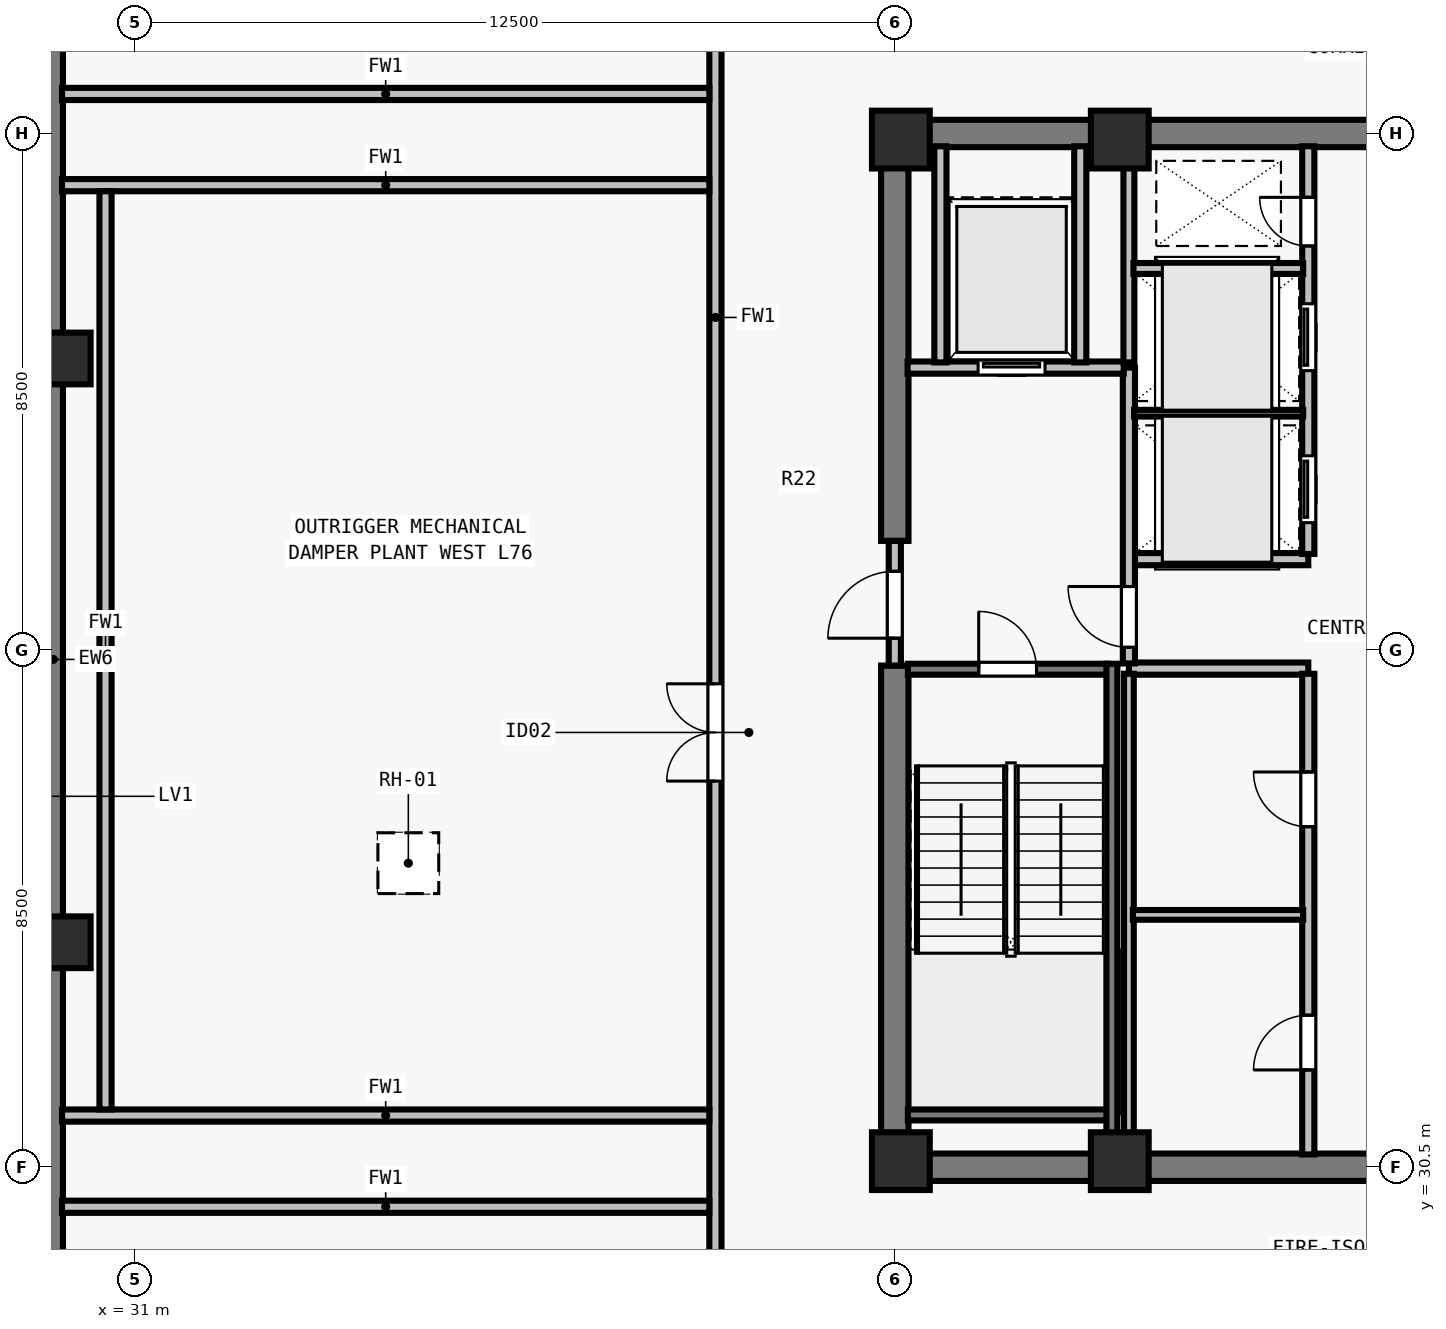
"""IFC4 building model, lengths in metres.
Left out: names, types, materials, properties, quantities, classifications, styles, units other than length and angle.
Written with IfcOpenShell. Run it as: python <this file> out.ifc"""

import sys

from ifc_helpers import new_model, si_unit, direction, frame, frame_2d, origin, origin_2d, place, context, subcontext, project, spatial, rectangle, extrude, element, fill, save


model = new_model("IFC4")
c1 = context("Model", 3, precision=1e-05, world=origin(), true_north=direction((0.0, 1.0)))
c2 = subcontext(c1, "Body", "Model", "MODEL_VIEW")
j1 = project(units=[si_unit("LENGTHUNIT", "METRE"), si_unit("PLANEANGLEUNIT", "RADIAN")], contexts=[c1])
p1 = place(None, origin())
s1 = spatial("IfcSite", under=j1, at=p1, CompositionType="ELEMENT")
p2 = place(p1, origin())
s2 = spatial("IfcBuilding", under=s1, at=p2, CompositionType="ELEMENT")
p3 = place(p2, frame((0.0, 0.0, 276.0)))
s3 = spatial("IfcBuildingStorey", under=s2, at=p3, CompositionType="ELEMENT", Elevation=276.0)
for number, where, z_axis, x_axis in (
    (1, (43.6, 30.6, 0.0), (0.0, 0.0, 1.0), (1.0, 0.0, 0.0)),
    (2, (47.2, 30.6, 0.0), (0.0, 0.0, 1.0), (1.0, 0.0, 0.0)),
    (3, (43.6, 47.4, 0.0), (0.0, 0.0, 1.0), (1.0, 0.0, 0.0)),
    (4, (47.2, 47.4, 0.0), (0.0, 0.0, 1.0), (1.0, 0.0, 0.0)),
):
    element("IfcColumn", number, at=place(p3, frame(where, z_axis=z_axis, x_axis=x_axis)), inside=s3, PredefinedType="COLUMN", context=c2, shape_type="SweptSolid", body=[
        extrude(rectangle(XDim=0.95, YDim=0.95, at=origin_2d()), origin(), (0.0, 0.0, 1.0), 4.5),
    ])
for number, where, z_axis, x_axis in (
    (5, (29.85, 43.8, 0.0), (0.0, 0.0, 1.0), (0.0, 1.0, 0.0)),
    (6, (29.85, 34.2, 0.0), (0.0, 0.0, 1.0), (0.0, 1.0, 0.0)),
):
    element("IfcColumn", number, at=place(p3, frame(where, z_axis=z_axis, x_axis=x_axis)), inside=s3, PredefinedType="COLUMN", context=c2, shape_type="SweptSolid", body=[
        extrude(rectangle(XDim=0.85, YDim=0.85, at=origin_2d()), origin(), (0.0, 0.0, 1.0), 4.5),
    ])
p4 = place(p3, frame((29.66, 21.5, 0.0), z_axis=(0.0, 0.0, 1.0), x_axis=(0.0, 1.0, 0.0)))
e7 = element("IfcWall", 7, at=p4, inside=s3, PredefinedType="SOLIDWALL", context=c2, shape_type="SweptSolid", body=[
    extrude(rectangle(XDim=34.702, YDim=0.32, at=frame_2d((17.351, 0.0))), origin(), (0.0, 0.0, 1.0), 4.29),
])
for number, where, z_axis, x_axis in (
    (8, (43.275, 30.5, 0.0), (0.0, 0.0, 1.0), (1.0, 0.0, 0.0)),
    (9, (43.275, 47.5, 0.0), (0.0, 0.0, 1.0), (1.0, 0.0, 0.0)),
):
    element("IfcWall", number, at=place(p3, frame(where, z_axis=z_axis, x_axis=x_axis)), inside=s3, PredefinedType="SHEAR", context=c2, shape_type="SweptSolid", body=[
        extrude(rectangle(XDim=17.45, YDim=0.45, at=frame_2d((8.725, 0.0))), origin(), (0.0, 0.0, 1.0), 4.29),
    ])
p5 = place(p3, frame((43.5, 30.715, 0.0), z_axis=(0.0, 0.0, 1.0), x_axis=(0.0, 1.0, 0.0)))
e10 = element("IfcWall", 10, at=p5, inside=s3, PredefinedType="SHEAR", context=c2, shape_type="SweptSolid", body=[
    extrude(rectangle(XDim=8.035, YDim=0.45, at=frame_2d((4.018, 0.0))), origin(), (0.0, 0.0, 1.0), 4.29),
])
p6 = place(p3, frame((43.5, 40.8, 0.0), z_axis=(0.0, 0.0, 1.0), x_axis=(0.0, 1.0, 0.0)))
e11 = element("IfcWall", 11, at=p6, inside=s3, PredefinedType="SHEAR", context=c2, shape_type="SweptSolid", body=[
    extrude(rectangle(XDim=6.485, YDim=0.45, at=frame_2d((3.242, 0.0))), origin(), (0.0, 0.0, 1.0), 4.29),
])
for number, where, z_axis, x_axis in (
    (12, (47.35, 38.7, 0.0), (0.0, 0.0, 1.0), (1.0, 0.0, 0.0)),
    (13, (47.35, 40.5, 0.0), (0.0, 0.0, 1.0), (1.0, 0.0, 0.0)),
):
    element("IfcWall", number, at=place(p3, frame(where, z_axis=z_axis, x_axis=x_axis)), inside=s3, PredefinedType="SOLIDWALL", context=c2, shape_type="SweptSolid", body=[
        extrude(rectangle(XDim=2.95, YDim=0.2, at=frame_2d((1.475, 0.0))), origin(), (0.0, 0.0, 1.0), 4.29),
    ])
p7 = place(p3, frame((50.3, 30.71, 0.0), z_axis=(0.0, 0.0, 1.0), x_axis=(0.0, 1.0, 0.0)))
e14 = element("IfcWall", 14, at=p7, inside=s3, PredefinedType="SOLIDWALL", context=c2, shape_type="SweptSolid", body=[
    extrude(rectangle(XDim=7.905, YDim=0.2, at=frame_2d((3.953, 0.0))), origin(), (0.0, 0.0, 1.0), 4.29),
])
p8 = place(p7, frame((1.39, 0.0, 0.0)))
e15 = element("IfcOpeningElement", 15, at=p8, cuts=e14, PredefinedType="OPENING", context=c2, shape_type="SweptSolid", body=[
    extrude(rectangle(XDim=0.9, YDim=2.12, at=frame_2d((0.45, 1.06))), frame((0.0, 0.11, 0.0), z_axis=(0.0, -1.0, 0.0), x_axis=(1.0, 0.0, 0.0)), (0.0, 0.0, 1.0), 0.22),
])
p9 = place(p7, frame((5.39, 0.0, 0.0)))
e16 = element("IfcOpeningElement", 16, at=p9, cuts=e14, PredefinedType="OPENING", context=c2, shape_type="SweptSolid", body=[
    extrude(rectangle(XDim=0.9, YDim=2.12, at=frame_2d((0.45, 1.06))), frame((0.0, 0.11, 0.0), z_axis=(0.0, -1.0, 0.0), x_axis=(1.0, 0.0, 0.0)), (0.0, 0.0, 1.0), 0.22),
])
p10 = place(p3, frame((50.3, 40.585, 0.0), z_axis=(0.0, 0.0, 1.0), x_axis=(0.0, 1.0, 0.0)))
e17 = element("IfcWall", 17, at=p10, inside=s3, PredefinedType="SOLIDWALL", context=c2, shape_type="SweptSolid", body=[
    extrude(rectangle(XDim=6.705, YDim=0.2, at=frame_2d((3.353, 0.0))), origin(), (0.0, 0.0, 1.0), 4.29),
])
p11 = place(p10, frame((0.515, 0.0, 0.0)))
e18 = element("IfcOpeningElement", 18, at=p11, cuts=e17, PredefinedType="OPENING", context=c2, shape_type="SweptSolid", body=[
    extrude(rectangle(XDim=1.1, YDim=2.2, at=frame_2d((0.55, 1.1))), frame((0.0, 0.11, 0.0), z_axis=(0.0, -1.0, 0.0), x_axis=(1.0, 0.0, 0.0)), (0.0, 0.0, 1.0), 0.22),
])
p12 = place(p10, frame((3.015, 0.0, 0.0)))
e19 = element("IfcOpeningElement", 19, at=p12, cuts=e17, PredefinedType="OPENING", context=c2, shape_type="SweptSolid", body=[
    extrude(rectangle(XDim=1.1, YDim=2.2, at=frame_2d((0.55, 1.1))), frame((0.0, 0.11, 0.0), z_axis=(0.0, -1.0, 0.0), x_axis=(1.0, 0.0, 0.0)), (0.0, 0.0, 1.0), 0.22),
])
p13 = place(p10, frame((5.065, 0.0, 0.0)))
e20 = element("IfcOpeningElement", 20, at=p13, cuts=e17, PredefinedType="OPENING", context=c2, shape_type="SweptSolid", body=[
    extrude(rectangle(XDim=0.8, YDim=2.08, at=frame_2d((0.4, 1.04))), frame((0.0, 0.11, 0.0), z_axis=(0.0, -1.0, 0.0), x_axis=(1.0, 0.0, 0.0)), (0.0, 0.0, 1.0), 0.22),
])
p14 = place(p3, frame((43.5, 38.75, 0.0), z_axis=(0.0, 0.0, 1.0), x_axis=(0.0, 1.0, 0.0)))
e21 = element("IfcWall", 21, at=p14, inside=s3, PredefinedType="SOLIDWALL", context=c2, shape_type="SweptSolid", body=[
    extrude(rectangle(XDim=2.05, YDim=0.2, at=frame_2d((1.025, 0.0))), origin(), (0.0, 0.0, 1.0), 4.29),
])
p15 = place(p14, frame((0.45, 0.0, 0.0)))
e22 = element("IfcOpeningElement", 22, at=p15, cuts=e21, PredefinedType="OPENING", context=c2, shape_type="SweptSolid", body=[
    extrude(rectangle(XDim=1.1, YDim=2.15, at=frame_2d((0.55, 1.075))), frame((0.0, 0.11, 0.0), z_axis=(0.0, -1.0, 0.0), x_axis=(1.0, 0.0, 0.0)), (0.0, 0.0, 1.0), 0.22),
])
p16 = place(p3, frame((47.35, 38.785, 0.0), z_axis=(0.0, 0.0, 1.0), x_axis=(0.0, 1.0, 0.0)))
e23 = element("IfcWall", 23, at=p16, inside=s3, PredefinedType="SOLIDWALL", context=c2, shape_type="SweptSolid", body=[
    extrude(rectangle(XDim=4.865, YDim=0.2, at=frame_2d((2.433, 0.0))), origin(), (0.0, 0.0, 1.0), 4.29),
])
p17 = place(p16, frame((0.265, 0.0, 0.0)))
e24 = element("IfcOpeningElement", 24, at=p17, cuts=e23, PredefinedType="OPENING", context=c2, shape_type="SweptSolid", body=[
    extrude(rectangle(XDim=1.0, YDim=2.15, at=frame_2d((0.5, 1.075))), frame((0.0, 0.11, 0.0), z_axis=(0.0, -1.0, 0.0), x_axis=(1.0, 0.0, 0.0)), (0.0, 0.0, 1.0), 0.22),
])
p18 = place(p3, frame((43.71, 43.65, 0.0), z_axis=(0.0, 0.0, 1.0), x_axis=(1.0, 0.0, 0.0)))
e25 = element("IfcWall", 25, at=p18, inside=s3, PredefinedType="SOLIDWALL", context=c2, shape_type="SweptSolid", body=[
    extrude(rectangle(XDim=3.555, YDim=0.2, at=frame_2d((1.777, 0.0))), origin(), (0.0, 0.0, 1.0), 4.29),
])
p19 = place(p18, frame((1.16, 0.0, 0.0)))
e26 = element("IfcOpeningElement", 26, at=p19, cuts=e25, PredefinedType="OPENING", context=c2, shape_type="SweptSolid", body=[
    extrude(rectangle(XDim=1.1, YDim=2.2, at=frame_2d((0.55, 1.1))), frame((0.0, 0.11, 0.0), z_axis=(0.0, -1.0, 0.0), x_axis=(1.0, 0.0, 0.0)), (0.0, 0.0, 1.0), 0.22),
])
for number, where, z_axis, x_axis in (
    (27, (46.55, 43.735, 0.0), (0.0, 0.0, 1.0), (0.0, 1.0, 0.0)),
    (28, (44.25, 43.735, 0.0), (0.0, 0.0, 1.0), (0.0, 1.0, 0.0)),
):
    element("IfcWall", number, at=place(p3, frame(where, z_axis=z_axis, x_axis=x_axis)), inside=s3, PredefinedType="SOLIDWALL", context=c2, shape_type="SweptSolid", body=[
        extrude(rectangle(XDim=3.555, YDim=0.2, at=frame_2d((1.777, 0.0))), origin(), (0.0, 0.0, 1.0), 4.29),
    ])
p20 = place(p3, frame((47.35, 30.71, 0.0), z_axis=(0.0, 0.0, 1.0), x_axis=(0.0, 1.0, 0.0)))
e29 = element("IfcWall", 29, at=p20, inside=s3, PredefinedType="PARTITIONING", context=c2, shape_type="SweptSolid", body=[
    extrude(rectangle(XDim=7.905, YDim=0.16, at=frame_2d((3.953, 0.0))), origin(), (0.0, 0.0, 1.0), 4.29),
])
p21 = place(p3, frame((47.415, 34.65, 0.0), z_axis=(0.0, 0.0, 1.0), x_axis=(1.0, 0.0, 0.0)))
e30 = element("IfcWall", 30, at=p21, inside=s3, PredefinedType="PARTITIONING", context=c2, shape_type="SweptSolid", body=[
    extrude(rectangle(XDim=2.8, YDim=0.16, at=frame_2d((1.4, 0.0))), origin(), (0.0, 0.0, 1.0), 4.29),
])
p22 = place(p3, frame((47.35, 43.735, 0.0), z_axis=(0.0, 0.0, 1.0), x_axis=(0.0, 1.0, 0.0)))
e31 = element("IfcWall", 31, at=p22, inside=s3, PredefinedType="SOLIDWALL", context=c2, shape_type="SweptSolid", body=[
    extrude(rectangle(XDim=3.555, YDim=0.18, at=frame_2d((1.777, 0.0))), origin(), (0.0, 0.0, 1.0), 4.29),
])
p23 = place(p3, frame((47.435, 42.9, 0.0), z_axis=(0.0, 0.0, 1.0), x_axis=(1.0, 0.0, 0.0)))
e32 = element("IfcWall", 32, at=p23, inside=s3, PredefinedType="PARTITIONING", context=c2, shape_type="SweptSolid", body=[
    extrude(rectangle(XDim=2.78, YDim=0.11, at=frame_2d((1.39, 0.0))), origin(), (0.0, 0.0, 1.0), 4.29),
])
p24 = place(p3, frame((47.425, 45.28, 0.0), z_axis=(0.0, 0.0, 1.0), x_axis=(1.0, 0.0, 0.0)))
e33 = element("IfcWall", 33, at=p24, inside=s3, PredefinedType="SOLIDWALL", context=c2, shape_type="SweptSolid", body=[
    extrude(rectangle(XDim=2.79, YDim=0.18, at=frame_2d((1.395, 0.0))), origin(), (0.0, 0.0, 1.0), 4.29),
])
p25 = place(p3, frame((40.55, 27.65, 0.0), z_axis=(0.0, 0.0, 1.0), x_axis=(0.0, 1.0, 0.0)))
e34 = element("IfcWall", 34, at=p25, inside=s3, PredefinedType="SOLIDWALL", context=c2, shape_type="SweptSolid", body=[
    extrude(rectangle(XDim=22.7, YDim=0.2, at=frame_2d((11.35, 0.0))), origin(), (0.0, 0.0, 1.0), 4.29),
])
p26 = place(p25, frame((9.2, 0.0, 0.0)))
e35 = element("IfcOpeningElement", 35, at=p26, cuts=e34, PredefinedType="OPENING", context=c2, shape_type="SweptSolid", body=[
    extrude(rectangle(XDim=1.6, YDim=2.2, at=frame_2d((0.8, 1.1))), frame((0.0, 0.11, 0.0), z_axis=(0.0, -1.0, 0.0), x_axis=(1.0, 0.0, 0.0)), (0.0, 0.0, 1.0), 0.22),
])
p27 = place(p3, frame((29.805, 29.85, 0.0), z_axis=(0.0, 0.0, 1.0), x_axis=(1.0, 0.0, 0.0)))
e36 = element("IfcWall", 36, at=p27, inside=s3, PredefinedType="SOLIDWALL", context=c2, shape_type="SweptSolid", body=[
    extrude(rectangle(XDim=10.645, YDim=0.2, at=frame_2d((5.323, 0.0))), origin(), (0.0, 0.0, 1.0), 4.29),
])
for number, where, z_axis, x_axis in (
    (37, (29.805, 31.35, 0.0), (0.0, 0.0, 1.0), (1.0, 0.0, 0.0)),
    (38, (29.805, 46.65, 0.0), (0.0, 0.0, 1.0), (1.0, 0.0, 0.0)),
):
    element("IfcWall", number, at=place(p3, frame(where, z_axis=z_axis, x_axis=x_axis)), inside=s3, PredefinedType="SOLIDWALL", context=c2, shape_type="SweptSolid", body=[
        extrude(rectangle(XDim=10.645, YDim=0.2, at=frame_2d((5.323, 0.0))), origin(), (0.0, 0.0, 1.0), 2.465),
    ])
p28 = place(p3, frame((29.805, 48.15, 0.0), z_axis=(0.0, 0.0, 1.0), x_axis=(1.0, 0.0, 0.0)))
e39 = element("IfcWall", 39, at=p28, inside=s3, PredefinedType="SOLIDWALL", context=c2, shape_type="SweptSolid", body=[
    extrude(rectangle(XDim=10.645, YDim=0.2, at=frame_2d((5.323, 0.0))), origin(), (0.0, 0.0, 1.0), 4.29),
])
p29 = place(p3, frame((30.52, 31.45, 0.0), z_axis=(0.0, 0.0, 1.0), x_axis=(0.0, 1.0, 0.0)))
e40 = element("IfcWall", 40, at=p29, inside=s3, PredefinedType="SOLIDWALL", context=c2, shape_type="SweptSolid", body=[
    extrude(rectangle(XDim=15.1, YDim=0.2, at=frame_2d((7.55, 0.0))), origin(), (0.0, 0.0, 1.0), 4.29),
])
p30 = place(p3, frame((43.715, 38.69, 0.0), z_axis=(0.0, 0.0, 1.0), x_axis=(1.0, 0.0, 0.0)))
e41 = element("IfcWall", 41, at=p30, inside=s3, PredefinedType="SOLIDWALL", context=c2, shape_type="SweptSolid", body=[
    extrude(rectangle(XDim=3.28, YDim=0.18, at=frame_2d((1.64, 0.0))), origin(), (0.0, 0.0, 1.0), 4.29),
])
p31 = place(p30, frame((1.165, 0.0, 0.0)))
e42 = element("IfcOpeningElement", 42, at=p31, cuts=e41, PredefinedType="OPENING", context=c2, shape_type="SweptSolid", body=[
    extrude(rectangle(XDim=0.95, YDim=2.15, at=frame_2d((0.475, 1.075))), frame((0.0, 0.1, 0.0), z_axis=(0.0, -1.0, 0.0), x_axis=(1.0, 0.0, 0.0)), (0.0, 0.0, 1.0), 0.2),
])
p32 = place(p3, frame((43.715, 31.36, 0.0), z_axis=(0.0, 0.0, 1.0), x_axis=(1.0, 0.0, 0.0)))
e43 = element("IfcWall", 43, at=p32, inside=s3, PredefinedType="SOLIDWALL", context=c2, shape_type="SweptSolid", body=[
    extrude(rectangle(XDim=3.28, YDim=0.18, at=frame_2d((1.64, 0.0))), origin(), (0.0, 0.0, 1.0), 4.29),
])
p33 = place(p3, frame((47.07, 38.78, 0.0), z_axis=(0.0, 0.0, 1.0), x_axis=(0.0, -1.0, 0.0)))
e44 = element("IfcWall", 44, at=p33, inside=s3, PredefinedType="SOLIDWALL", context=c2, shape_type="SweptSolid", body=[
    extrude(rectangle(XDim=8.067, YDim=0.18, at=frame_2d((4.034, 0.0))), origin(), (0.0, 0.0, 1.0), 4.29),
])
p34 = place(p3, frame((0.0, 0.0, -0.26)))
p35 = place(p34, frame((35.5, 35.5, 0.0)))
p36 = place(p35, frame((0.0, 0.0, 0.21)))
e45 = element("IfcDoor", 45, at=p36, inside=s3, OperationType="SINGLE_SWING_LEFT", PredefinedType="TRAPDOOR", context=c2, shape_type="SweptSolid", body=[
    extrude(rectangle(XDim=1.0, YDim=1.0, at=origin_2d()), origin(), (0.0, 0.0, 1.0), 0.05),
])
p37 = place(p15, origin())
e46 = element("IfcDoor", 46, at=p37, inside=s3, OperationType="SINGLE_SWING_LEFT", PredefinedType="DOOR", context=c2, shape_type="SweptSolid", body=[
    extrude(rectangle(XDim=1.1, YDim=2.15, at=frame_2d((0.55, 1.075))), frame((0.0, 0.025, 0.0), z_axis=(0.0, -1.0, 0.0), x_axis=(1.0, 0.0, 0.0)), (0.0, 0.0, 1.0), 0.05),
])
fill(e22, e46)
p38 = place(p17, origin())
e47 = element("IfcDoor", 47, at=p38, inside=s3, OperationType="SINGLE_SWING_RIGHT", PredefinedType="DOOR", context=c2, shape_type="SweptSolid", body=[
    extrude(rectangle(XDim=1.0, YDim=2.15, at=frame_2d((0.5, 1.075))), frame((0.0, 0.025, 0.0), z_axis=(0.0, -1.0, 0.0), x_axis=(1.0, 0.0, 0.0)), (0.0, 0.0, 1.0), 0.05),
])
fill(e24, e47)
p39 = place(p19, origin())
e48 = element("IfcDoor", 48, at=p39, inside=s3, OperationType="SLIDING_TO_LEFT", PredefinedType="DOOR", context=c2, shape_type="SweptSolid", body=[
    extrude(rectangle(XDim=1.1, YDim=2.2, at=frame_2d((0.55, 1.1))), frame((0.0, 0.025, 0.0), z_axis=(0.0, -1.0, 0.0), x_axis=(1.0, 0.0, 0.0)), (0.0, 0.0, 1.0), 0.05),
])
fill(e26, e48)
p40 = place(p8, origin())
e49 = element("IfcDoor", 49, at=p40, inside=s3, OperationType="SINGLE_SWING_LEFT", PredefinedType="DOOR", context=c2, shape_type="SweptSolid", body=[
    extrude(rectangle(XDim=0.9, YDim=2.12, at=frame_2d((0.45, 1.06))), frame((0.0, 0.025, 0.0), z_axis=(0.0, -1.0, 0.0), x_axis=(1.0, 0.0, 0.0)), (0.0, 0.0, 1.0), 0.05),
])
fill(e15, e49)
p41 = place(p9, origin())
e50 = element("IfcDoor", 50, at=p41, inside=s3, OperationType="SINGLE_SWING_RIGHT", PredefinedType="DOOR", context=c2, shape_type="SweptSolid", body=[
    extrude(rectangle(XDim=0.9, YDim=2.12, at=frame_2d((0.45, 1.06))), frame((0.0, 0.025, 0.0), z_axis=(0.0, -1.0, 0.0), x_axis=(1.0, 0.0, 0.0)), (0.0, 0.0, 1.0), 0.05),
])
fill(e16, e50)
p42 = place(p11, origin())
e51 = element("IfcDoor", 51, at=p42, inside=s3, OperationType="SLIDING_TO_LEFT", PredefinedType="DOOR", context=c2, shape_type="SweptSolid", body=[
    extrude(rectangle(XDim=1.1, YDim=2.2, at=frame_2d((0.55, 1.1))), frame((0.0, 0.025, 0.0), z_axis=(0.0, -1.0, 0.0), x_axis=(1.0, 0.0, 0.0)), (0.0, 0.0, 1.0), 0.05),
])
fill(e18, e51)
p43 = place(p12, origin())
e52 = element("IfcDoor", 52, at=p43, inside=s3, OperationType="SLIDING_TO_LEFT", PredefinedType="DOOR", context=c2, shape_type="SweptSolid", body=[
    extrude(rectangle(XDim=1.1, YDim=2.2, at=frame_2d((0.55, 1.1))), frame((0.0, 0.025, 0.0), z_axis=(0.0, -1.0, 0.0), x_axis=(1.0, 0.0, 0.0)), (0.0, 0.0, 1.0), 0.05),
])
fill(e19, e52)
p44 = place(p13, origin())
e53 = element("IfcDoor", 53, at=p44, inside=s3, OperationType="SINGLE_SWING_RIGHT", PredefinedType="DOOR", context=c2, shape_type="SweptSolid", body=[
    extrude(rectangle(XDim=0.8, YDim=2.08, at=frame_2d((0.4, 1.04))), frame((0.0, 0.025, 0.0), z_axis=(0.0, -1.0, 0.0), x_axis=(1.0, 0.0, 0.0)), (0.0, 0.0, 1.0), 0.05),
])
fill(e20, e53)
p45 = place(p26, origin())
e54 = element("IfcDoor", 54, at=p45, inside=s3, OperationType="DOUBLE_DOOR_SINGLE_SWING", PredefinedType="DOOR", context=c2, shape_type="SweptSolid", body=[
    extrude(rectangle(XDim=1.6, YDim=2.2, at=frame_2d((0.8, 1.1))), frame((0.0, 0.025, 0.0), z_axis=(0.0, -1.0, 0.0), x_axis=(1.0, 0.0, 0.0)), (0.0, 0.0, 1.0), 0.05),
])
fill(e35, e54)
p46 = place(p31, origin())
e55 = element("IfcDoor", 55, at=p46, inside=s3, OperationType="SINGLE_SWING_LEFT", PredefinedType="DOOR", context=c2, shape_type="SweptSolid", body=[
    extrude(rectangle(XDim=0.95, YDim=2.15, at=frame_2d((0.475, 1.075))), frame((0.0, 0.025, 0.0), z_axis=(0.0, -1.0, 0.0), x_axis=(1.0, 0.0, 0.0)), (0.0, 0.0, 1.0), 0.05),
])
fill(e42, e55)
save(model, sys.argv[1])
